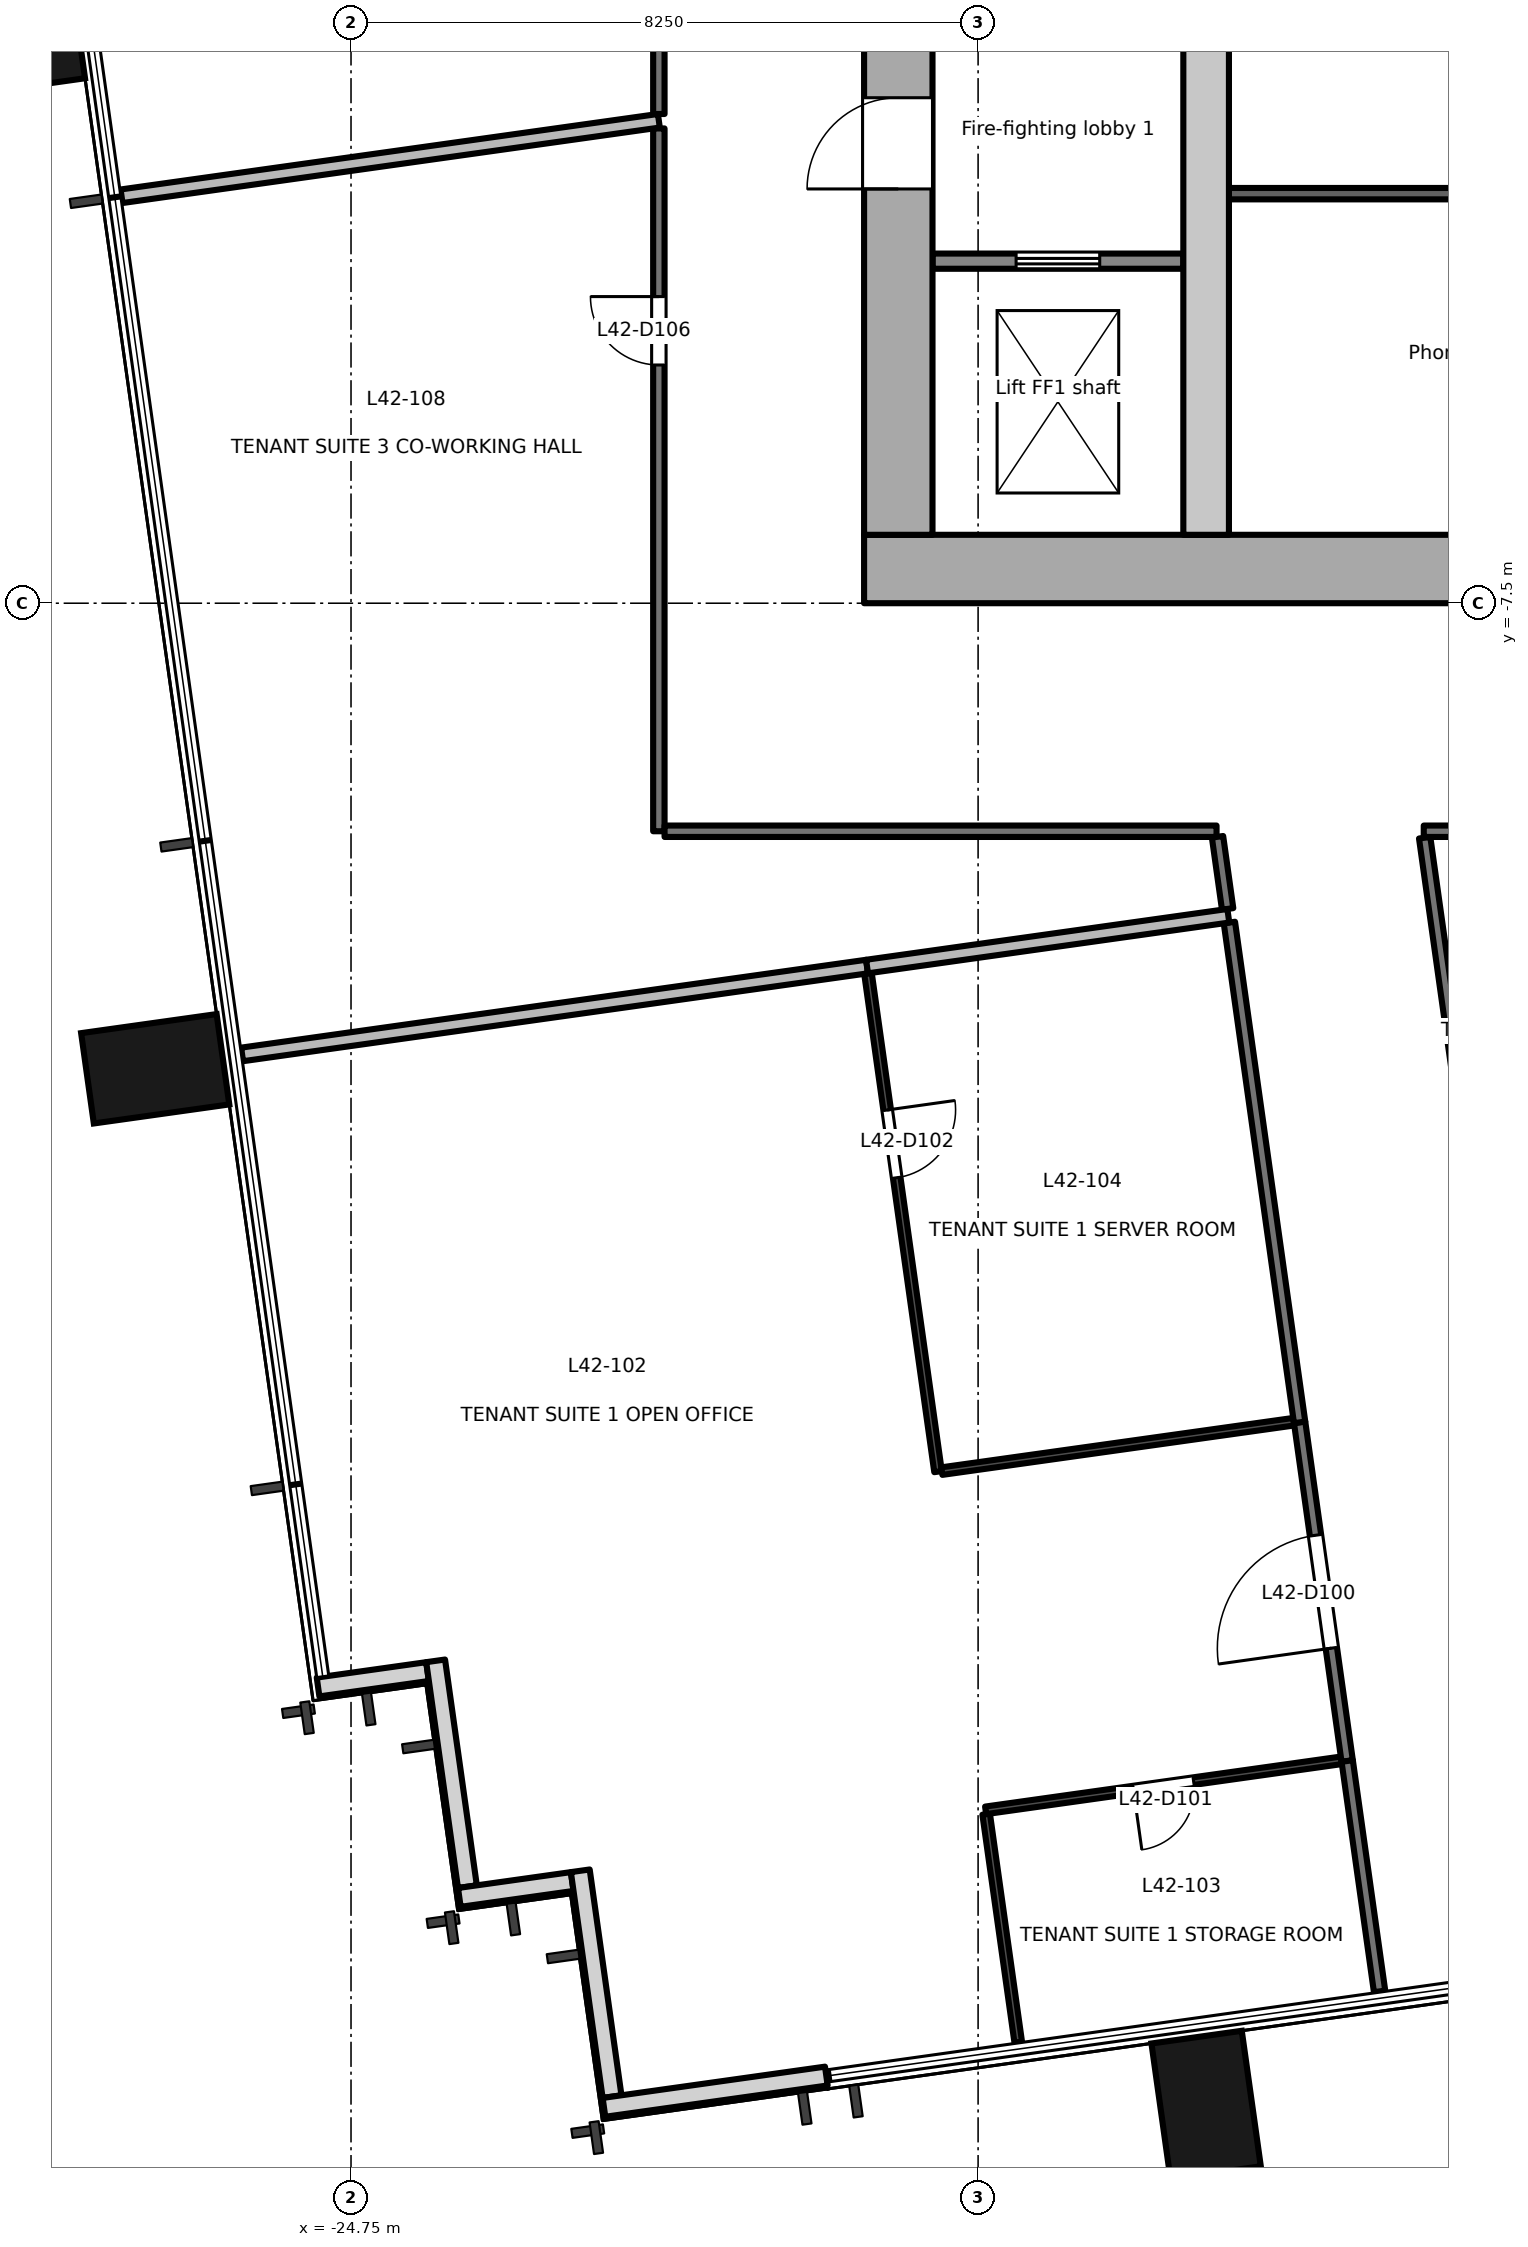
"""IFC4 building model, lengths in metres.
Left out: names, types, materials, properties, quantities, classifications, styles, units other than length and angle.
Written with IfcOpenShell. Run it as: python <this file> out.ifc"""

import sys

from ifc_helpers import new_model, si_unit, direction, frame, frame_2d, origin, origin_2d, place, context, subcontext, project, spatial, rectangle, extrude, element, fill, save


model = new_model("IFC4")
c1 = context("Model", 3, precision=1e-05, world=origin(), true_north=direction((0.0, 1.0)))
c2 = subcontext(c1, "Body", "Model", "MODEL_VIEW")
j1 = project(units=[si_unit("LENGTHUNIT", "METRE"), si_unit("PLANEANGLEUNIT", "RADIAN")], contexts=[c1])
p1 = place(None, origin())
s1 = spatial("IfcSite", under=j1, at=p1, CompositionType="ELEMENT")
p2 = place(p1, origin())
s2 = spatial("IfcBuilding", under=s1, at=p2, CompositionType="ELEMENT")
p3 = place(p2, frame((0.0, 0.0, 184.1)))
s3 = spatial("IfcBuildingStorey", under=s2, at=p3, CompositionType="ELEMENT", Elevation=184.1)
for number, where, z_axis, x_axis in (
    (1, (-13.5, -27.256, -0.2), (0.0, 0.0, 1.0), (0.99, 0.139, 0.0)),
    (2, (-27.326, -13.625, -0.2), (0.0, 0.0, 1.0), (-0.139, 0.99, 0.0)),
    (3, (-29.224, -0.125, -0.2), (0.0, 0.0, 1.0), (-0.139, 0.99, 0.0)),
):
    element("IfcColumn", number, at=place(p3, frame(where, z_axis=z_axis, x_axis=x_axis)), inside=s3, PredefinedType="COLUMN", context=c2, shape_type="SweptSolid", body=[
        extrude(rectangle(XDim=1.2, YDim=1.8, at=origin_2d()), origin(), (0.0, 0.0, 1.0), 3.9),
    ])
p4 = place(p3, frame((-25.184, -21.758, 0.0), z_axis=(0.0, 0.0, 1.0), x_axis=(0.9902493448, 0.13930626376, 0.0)))
e4 = element("IfcWall", 4, at=p4, inside=s3, PredefinedType="SOLIDWALL", context=c2, shape_type="SweptSolid", body=[
    extrude(rectangle(XDim=1.455, YDim=0.25, at=frame_2d((0.727, 0.0))), origin(), (0.0, 0.0, 1.0), 3.7),
])
p5 = place(p3, frame((-23.637, -21.414, 0.0), z_axis=(0.0, 0.0, 1.0), x_axis=(0.139313431826, -0.990248336385, 0.0)))
e5 = element("IfcWall", 5, at=p5, inside=s3, PredefinedType="SOLIDWALL", context=c2, shape_type="SweptSolid", body=[
    extrude(rectangle(XDim=3.0, YDim=0.25, at=frame_2d((1.5, 0.0))), origin(), (0.0, 0.0, 1.0), 3.7),
])
p6 = place(p3, frame((-23.325, -24.526, 0.0), z_axis=(0.0, 0.0, 1.0), x_axis=(0.990243596651, 0.13934711799, 0.0)))
e6 = element("IfcWall", 6, at=p6, inside=s3, PredefinedType="SOLIDWALL", context=c2, shape_type="SweptSolid", body=[
    extrude(rectangle(XDim=1.5, YDim=0.25, at=frame_2d((0.75, 0.0))), origin(), (0.0, 0.0, 1.0), 3.7),
])
p7 = place(p3, frame((-21.734, -24.176, 0.0), z_axis=(0.0, 0.0, 1.0), x_axis=(0.139313431826, -0.990248336385, 0.0)))
e7 = element("IfcWall", 7, at=p7, inside=s3, PredefinedType="SOLIDWALL", context=c2, shape_type="SweptSolid", body=[
    extrude(rectangle(XDim=3.0, YDim=0.25, at=frame_2d((1.5, 0.0))), origin(), (0.0, 0.0, 1.0), 3.7),
])
p8 = place(p3, frame((-21.422, -27.288, 0.0), z_axis=(0.0, 0.0, 1.0), x_axis=(0.990246427036, 0.139327002919, 0.0)))
e8 = element("IfcWall", 8, at=p8, inside=s3, PredefinedType="SOLIDWALL", context=c2, shape_type="SweptSolid", body=[
    extrude(rectangle(XDim=2.954, YDim=0.25, at=frame_2d((1.477, 0.0))), origin(), (0.0, 0.0, 1.0), 3.7),
])
p9 = place(p3, frame((-18.0, -7.05, -0.2), z_axis=(0.0, 0.0, 1.0), x_axis=(1.0, 0.0, 0.0)))
e9 = element("IfcWall", 9, at=p9, inside=s3, PredefinedType="SHEAR", context=c2, shape_type="SweptSolid", body=[
    extrude(rectangle(XDim=36.0, YDim=0.9, at=frame_2d((18.0, 0.0))), origin(), (0.0, 0.0, 1.0), 3.9),
])
p10 = place(p9, frame((11.3, 0.0, 0.2)))
e10 = element("IfcOpeningElement", 10, at=p10, cuts=e9, PredefinedType="OPENING", context=c2, shape_type="SweptSolid", body=[
    extrude(rectangle(XDim=1.8, YDim=2.1, at=frame_2d((0.9, 1.05))), frame((0.0, 0.46, 0.0), z_axis=(0.0, -1.0, 0.0), x_axis=(1.0, 0.0, 0.0)), (0.0, 0.0, 1.0), 0.921),
])
p11 = place(p9, frame((16.8, 0.0, 0.2)))
e11 = element("IfcOpeningElement", 11, at=p11, cuts=e9, PredefinedType="OPENING", context=c2, shape_type="SweptSolid", body=[
    extrude(rectangle(XDim=2.4, YDim=2.1, at=frame_2d((1.2, 1.05))), frame((0.0, 0.46, 0.0), z_axis=(0.0, -1.0, 0.0), x_axis=(1.0, 0.0, 0.0)), (0.0, 0.0, 1.0), 0.921),
])
p12 = place(p9, frame((26.1, 0.0, 0.2)))
e12 = element("IfcOpeningElement", 12, at=p12, cuts=e9, PredefinedType="OPENING", context=c2, shape_type="SweptSolid", body=[
    extrude(rectangle(XDim=2.4, YDim=2.1, at=frame_2d((1.2, 1.05))), frame((0.0, 0.46, 0.0), z_axis=(0.0, -1.0, 0.0), x_axis=(1.0, 0.0, 0.0)), (0.0, 0.0, 1.0), 0.921),
])
p13 = place(p3, frame((-17.55, -6.6, -0.2), z_axis=(0.0, 0.0, 1.0), x_axis=(0.0, 1.0, 0.0)))
e13 = element("IfcWall", 13, at=p13, inside=s3, PredefinedType="SHEAR", context=c2, shape_type="SweptSolid", body=[
    extrude(rectangle(XDim=13.2, YDim=0.9, at=frame_2d((6.6, 0.0))), origin(), (0.0, 0.0, 1.0), 3.9),
])
p14 = place(p13, frame((4.55, 0.0, 0.2)))
e14 = element("IfcOpeningElement", 14, at=p14, cuts=e13, PredefinedType="OPENING", context=c2, shape_type="SweptSolid", body=[
    extrude(rectangle(XDim=1.2, YDim=2.1, at=frame_2d((0.6, 1.05))), frame((0.0, 0.46, 0.0), z_axis=(0.0, -1.0, 0.0), x_axis=(1.0, 0.0, 0.0)), (0.0, 0.0, 1.0), 0.921),
])
p15 = place(p3, frame((-13.5, -6.6, -0.2), z_axis=(0.0, 0.0, 1.0), x_axis=(0.0, 1.0, 0.0)))
e15 = element("IfcWall", 15, at=p15, inside=s3, PredefinedType="SHEAR", context=c2, shape_type="SweptSolid", body=[
    extrude(rectangle(XDim=13.2, YDim=0.6, at=frame_2d((6.6, 0.0))), origin(), (0.0, 0.0, 1.0), 3.9),
])
p16 = place(p3, frame((-17.1, -3.0, 0.0), z_axis=(0.0, 0.0, 1.0), x_axis=(1.0, 0.0, 0.0)))
e16 = element("IfcWall", 16, at=p16, inside=s3, PredefinedType="PARTITIONING", context=c2, shape_type="SweptSolid", body=[
    extrude(rectangle(XDim=3.3, YDim=0.2, at=frame_2d((1.65, 0.0))), origin(), (0.0, 0.0, 1.0), 3.7),
])
p17 = place(p16, frame((1.1, 0.0, 0.0)))
e17 = element("IfcOpeningElement", 17, at=p17, cuts=e16, PredefinedType="OPENING", context=c2, shape_type="SweptSolid", body=[
    extrude(rectangle(XDim=1.1, YDim=2.1, at=frame_2d((0.55, 1.05))), frame((0.0, 0.111, 0.0), z_axis=(0.0, -1.0, 0.0), x_axis=(1.0, 0.0, 0.0)), (0.0, 0.0, 1.0), 0.221),
])
p18 = place(p3, frame((-13.2, -2.112, 0.0), z_axis=(0.0, 0.0, 1.0), x_axis=(1.0, 0.0, 0.0)))
e18 = element("IfcWall", 18, at=p18, inside=s3, PredefinedType="PARTITIONING", context=c2, shape_type="SweptSolid", body=[
    extrude(rectangle(XDim=6.25, YDim=0.15, at=frame_2d((3.125, 0.0))), origin(), (0.0, 0.0, 1.0), 3.7),
])
p19 = place(p3, frame((-11.644, -22.733, 0.0), z_axis=(0.0, 0.0, 1.0), x_axis=(-0.139081954514, 0.990280874262, 0.0)))
e19 = element("IfcWall", 19, at=p19, inside=s3, PredefinedType="PARTITIONING", context=c2, shape_type="SweptSolid", body=[
    extrude(rectangle(XDim=4.501, YDim=0.15, at=frame_2d((2.25, 0.0))), origin(), (0.0, 0.0, 1.0), 3.7),
])
p20 = place(p19, frame((1.5, 0.0, 0.0)))
e20 = element("IfcOpeningElement", 20, at=p20, cuts=e19, PredefinedType="OPENING", context=c2, shape_type="SweptSolid", body=[
    extrude(rectangle(XDim=1.5, YDim=2.1, at=frame_2d((0.75, 1.05))), frame((0.0, 0.085, 0.0), z_axis=(0.0, -1.0, 0.0), x_axis=(1.0, 0.0, 0.0)), (0.0, 0.0, 1.0), 0.171),
])
p21 = place(p3, frame((-11.218, -25.763, 0.0), z_axis=(0.0, 0.0, 1.0), x_axis=(-0.139187613425, 0.990266029039, 0.0)))
e21 = element("IfcWall", 21, at=p21, inside=s3, PredefinedType="PARTITIONING", context=c2, shape_type="SweptSolid", body=[
    extrude(rectangle(XDim=3.061, YDim=0.15, at=frame_2d((1.53, 0.0))), origin(), (0.0, 0.0, 1.0), 3.7),
])
p22 = place(p3, frame((-12.27, -18.277, 0.0), z_axis=(0.0, 0.0, 1.0), x_axis=(-0.139151184207, 0.990271148693, 0.0)))
e22 = element("IfcWall", 22, at=p22, inside=s3, PredefinedType="PARTITIONING", context=c2, shape_type="SweptSolid", body=[
    extrude(rectangle(XDim=6.641, YDim=0.15, at=frame_2d((3.32, 0.0))), origin(), (0.0, 0.0, 1.0), 3.7),
])
p23 = place(p3, frame((-20.7, -10.5, 0.0), z_axis=(0.0, 0.0, 1.0), x_axis=(0.0, 1.0, 0.0)))
e23 = element("IfcWall", 23, at=p23, inside=s3, PredefinedType="PARTITIONING", context=c2, shape_type="SweptSolid", body=[
    extrude(rectangle(XDim=9.246, YDim=0.15, at=frame_2d((4.623, 0.0))), origin(), (0.0, 0.0, 1.0), 3.25),
])
p24 = place(p23, frame((6.134, 0.0, 0.0)))
e24 = element("IfcOpeningElement", 24, at=p24, cuts=e23, PredefinedType="OPENING", context=c2, shape_type="SweptSolid", body=[
    extrude(rectangle(XDim=0.9, YDim=2.1, at=frame_2d((0.45, 1.05))), frame((0.0, 0.085, 0.0), z_axis=(0.0, -1.0, 0.0), x_axis=(1.0, 0.0, 0.0)), (0.0, 0.0, 1.0), 0.171),
])
p25 = place(p3, frame((-13.363, -10.5, 0.0), z_axis=(0.0, 0.0, 1.0), x_axis=(-1.0, 0.0, 0.0)))
e25 = element("IfcWall", 25, at=p25, inside=s3, PredefinedType="PARTITIONING", context=c2, shape_type="SweptSolid", body=[
    extrude(rectangle(XDim=7.262, YDim=0.15, at=frame_2d((3.631, 0.0))), origin(), (0.0, 0.0, 1.0), 2.8),
])
p26 = place(p3, frame((-13.217, -11.522, 0.0), z_axis=(0.0, 0.0, 1.0), x_axis=(-0.138852741578, 0.990313039476, 0.0)))
e26 = element("IfcWall", 26, at=p26, inside=s3, PredefinedType="PARTITIONING", context=c2, shape_type="SweptSolid", body=[
    extrude(rectangle(XDim=0.958, YDim=0.15, at=frame_2d((0.479, 0.0))), origin(), (0.0, 0.0, 1.0), 2.8),
])
p27 = place(p3, frame((-20.7, -1.064, 0.0), z_axis=(0.0, 0.0, 1.0), x_axis=(0.0, 1.0, 0.0)))
e27 = element("IfcWall", 27, at=p27, inside=s3, PredefinedType="PARTITIONING", context=c2, shape_type="SweptSolid", body=[
    extrude(rectangle(XDim=8.564, YDim=0.15, at=frame_2d((4.282, 0.0))), origin(), (0.0, 0.0, 1.0), 3.2),
])
p28 = place(p27, frame((3.382, 0.0, 0.0)))
e28 = element("IfcOpeningElement", 28, at=p28, cuts=e27, PredefinedType="OPENING", context=c2, shape_type="SweptSolid", body=[
    extrude(rectangle(XDim=1.8, YDim=2.1, at=frame_2d((0.9, 1.05))), frame((0.0, 0.085, 0.0), z_axis=(0.0, -1.0, 0.0), x_axis=(1.0, 0.0, 0.0)), (0.0, 0.0, 1.0), 0.171),
])
p29 = place(p3, frame((-10.625, -10.585, 0.0), z_axis=(0.0, 0.0, 1.0), x_axis=(0.138987741071, -0.990294101685, 0.0)))
e29 = element("IfcWall", 29, at=p29, inside=s3, PredefinedType="PARTITIONING", context=c2, shape_type="SweptSolid", body=[
    extrude(rectangle(XDim=4.734, YDim=0.15, at=frame_2d((2.367, 0.0))), origin(), (0.0, 0.0, 1.0), 3.7),
])
p30 = place(p3, frame((-5.203, -10.5, 0.0), z_axis=(0.0, 0.0, 1.0), x_axis=(-1.0, 0.0, 0.0)))
e30 = element("IfcWall", 30, at=p30, inside=s3, PredefinedType="PARTITIONING", context=c2, shape_type="SweptSolid", body=[
    extrude(rectangle(XDim=5.434, YDim=0.15, at=frame_2d((2.717, 0.0))), origin(), (0.0, 0.0, 1.0), 2.8),
])
p31 = place(p3, frame((-16.394, -23.431, 0.0), z_axis=(0.0, 0.0, 1.0), x_axis=(0.139333854614, -0.990245462983, 0.0)))
e31 = element("IfcWall", 31, at=p31, inside=s3, PredefinedType="PARTITIONING", context=c2, shape_type="SweptSolid", body=[
    extrude(rectangle(XDim=3.03, YDim=0.1, at=frame_2d((1.515, 0.0))), origin(), (0.0, 0.0, 1.0), 3.7),
])
p32 = place(p3, frame((-11.721, -22.723, 0.0), z_axis=(0.0, 0.0, 1.0), x_axis=(-0.990254018594, -0.139273036368, 0.0)))
e32 = element("IfcWall", 32, at=p32, inside=s3, PredefinedType="PARTITIONING", context=c2, shape_type="SweptSolid", body=[
    extrude(rectangle(XDim=4.726, YDim=0.1, at=frame_2d((2.363, 0.0))), origin(), (0.0, 0.0, 1.0), 2.8),
])
p33 = place(p32, frame((1.963, 0.0, 0.0)))
e33 = element("IfcOpeningElement", 33, at=p33, cuts=e32, PredefinedType="OPENING", context=c2, shape_type="SweptSolid", body=[
    extrude(rectangle(XDim=0.8, YDim=2.1, at=frame_2d((0.4, 1.05))), frame((0.0, 0.061, 0.0), z_axis=(0.0, -1.0, 0.0), x_axis=(1.0, 0.0, 0.0)), (0.0, 0.0, 1.0), 0.121),
])
p34 = place(p3, frame((-17.949, -12.369, 0.0), z_axis=(0.0, 0.0, 1.0), x_axis=(0.1392424012, -0.990258326755, 0.0)))
e34 = element("IfcWall", 34, at=p34, inside=s3, PredefinedType="PARTITIONING", context=c2, shape_type="SweptSolid", body=[
    extrude(rectangle(XDim=6.621, YDim=0.1, at=frame_2d((3.31, 0.0))), origin(), (0.0, 0.0, 1.0), 3.7),
])
p35 = place(p34, frame((1.816, 0.0, 0.0)))
e35 = element("IfcOpeningElement", 35, at=p35, cuts=e34, PredefinedType="OPENING", context=c2, shape_type="SweptSolid", body=[
    extrude(rectangle(XDim=0.9, YDim=2.1, at=frame_2d((0.45, 1.05))), frame((0.0, 0.061, 0.0), z_axis=(0.0, -1.0, 0.0), x_axis=(1.0, 0.0, 0.0)), (0.0, 0.0, 1.0), 0.121),
])
p36 = place(p3, frame((-16.977, -18.918, 0.0), z_axis=(0.0, 0.0, 1.0), x_axis=(0.990292211818, 0.139001205793, 0.0)))
e36 = element("IfcWall", 36, at=p36, inside=s3, PredefinedType="PARTITIONING", context=c2, shape_type="SweptSolid", body=[
    extrude(rectangle(XDim=4.676, YDim=0.1, at=frame_2d((2.338, 0.0))), origin(), (0.0, 0.0, 1.0), 2.8),
])
p37 = place(p3, frame((-26.183, -13.436, 0.0), z_axis=(0.0, 0.0, 1.0), x_axis=(0.990260506457, 0.139226898809, 0.0)))
e37 = element("IfcWall", 37, at=p37, inside=s3, PredefinedType="PARTITIONING", context=c2, shape_type="SweptSolid", body=[
    extrude(rectangle(XDim=8.303, YDim=0.18, at=frame_2d((4.151, 0.0))), origin(), (0.0, 0.0, 1.0), 3.7),
])
p38 = place(p3, frame((-17.961, -12.28, 0.0), z_axis=(0.0, 0.0, 1.0), x_axis=(0.990268412035, 0.139170658277, 0.0)))
e38 = element("IfcWall", 38, at=p38, inside=s3, PredefinedType="PARTITIONING", context=c2, shape_type="SweptSolid", body=[
    extrude(rectangle(XDim=4.8, YDim=0.18, at=frame_2d((2.4, 0.0))), origin(), (0.0, 0.0, 1.0), 2.8),
])
p39 = place(p3, frame((-27.769, -2.146, 0.0), z_axis=(0.0, 0.0, 1.0), x_axis=(0.990279188786, 0.139093954785, 0.0)))
e39 = element("IfcWall", 39, at=p39, inside=s3, PredefinedType="PARTITIONING", context=c2, shape_type="SweptSolid", body=[
    extrude(rectangle(XDim=7.138, YDim=0.18, at=frame_2d((3.569, 0.0))), origin(), (0.0, 0.0, 1.0), 3.7),
])
p40 = place(p17, origin())
e40 = element("IfcDoor", 40, at=p40, inside=s3, OperationType="DOUBLE_DOOR_SLIDING", PredefinedType="DOOR", context=c2, shape_type="SweptSolid", body=[
    extrude(rectangle(XDim=1.1, YDim=2.1, at=frame_2d((0.55, 1.05))), frame((0.0, 0.025, 0.0), z_axis=(0.0, -1.0, 0.0), x_axis=(1.0, 0.0, 0.0)), (0.0, 0.0, 1.0), 0.05),
])
fill(e17, e40)
p41 = place(p14, origin())
e41 = element("IfcDoor", 41, at=p41, inside=s3, OperationType="SINGLE_SWING_LEFT", PredefinedType="DOOR", context=c2, shape_type="SweptSolid", body=[
    extrude(rectangle(XDim=1.2, YDim=2.1, at=frame_2d((0.6, 1.05))), frame((0.0, 0.025, 0.0), z_axis=(0.0, -1.0, 0.0), x_axis=(1.0, 0.0, 0.0)), (0.0, 0.0, 1.0), 0.05),
])
fill(e14, e41)
p42 = place(p20, origin())
e42 = element("IfcDoor", 42, at=p42, inside=s3, OperationType="DOUBLE_DOOR_SINGLE_SWING", PredefinedType="DOOR", context=c2, shape_type="SweptSolid", body=[
    extrude(rectangle(XDim=1.5, YDim=2.1, at=frame_2d((0.75, 1.05))), frame((0.0, 0.025, 0.0), z_axis=(0.0, -1.0, 0.0), x_axis=(1.0, 0.0, 0.0)), (0.0, 0.0, 1.0), 0.05),
])
fill(e20, e42)
p43 = place(p33, origin())
e43 = element("IfcDoor", 43, at=p43, inside=s3, OperationType="SINGLE_SWING_RIGHT", PredefinedType="DOOR", context=c2, shape_type="SweptSolid", body=[
    extrude(rectangle(XDim=0.8, YDim=2.1, at=frame_2d((0.4, 1.05))), frame((0.0, 0.025, 0.0), z_axis=(0.0, -1.0, 0.0), x_axis=(1.0, 0.0, 0.0)), (0.0, 0.0, 1.0), 0.05),
])
fill(e33, e43)
p44 = place(p35, origin())
e44 = element("IfcDoor", 44, at=p44, inside=s3, OperationType="SINGLE_SWING_LEFT", PredefinedType="DOOR", context=c2, shape_type="SweptSolid", body=[
    extrude(rectangle(XDim=0.9, YDim=2.1, at=frame_2d((0.45, 1.05))), frame((0.0, 0.025, 0.0), z_axis=(0.0, -1.0, 0.0), x_axis=(1.0, 0.0, 0.0)), (0.0, 0.0, 1.0), 0.05),
])
fill(e35, e44)
p45 = place(p24, origin())
e45 = element("IfcDoor", 45, at=p45, inside=s3, OperationType="SINGLE_SWING_RIGHT", PredefinedType="DOOR", context=c2, shape_type="SweptSolid", body=[
    extrude(rectangle(XDim=0.9, YDim=2.1, at=frame_2d((0.45, 1.05))), frame((0.0, 0.025, 0.0), z_axis=(0.0, -1.0, 0.0), x_axis=(1.0, 0.0, 0.0)), (0.0, 0.0, 1.0), 0.05),
])
fill(e24, e45)
save(model, sys.argv[1])
